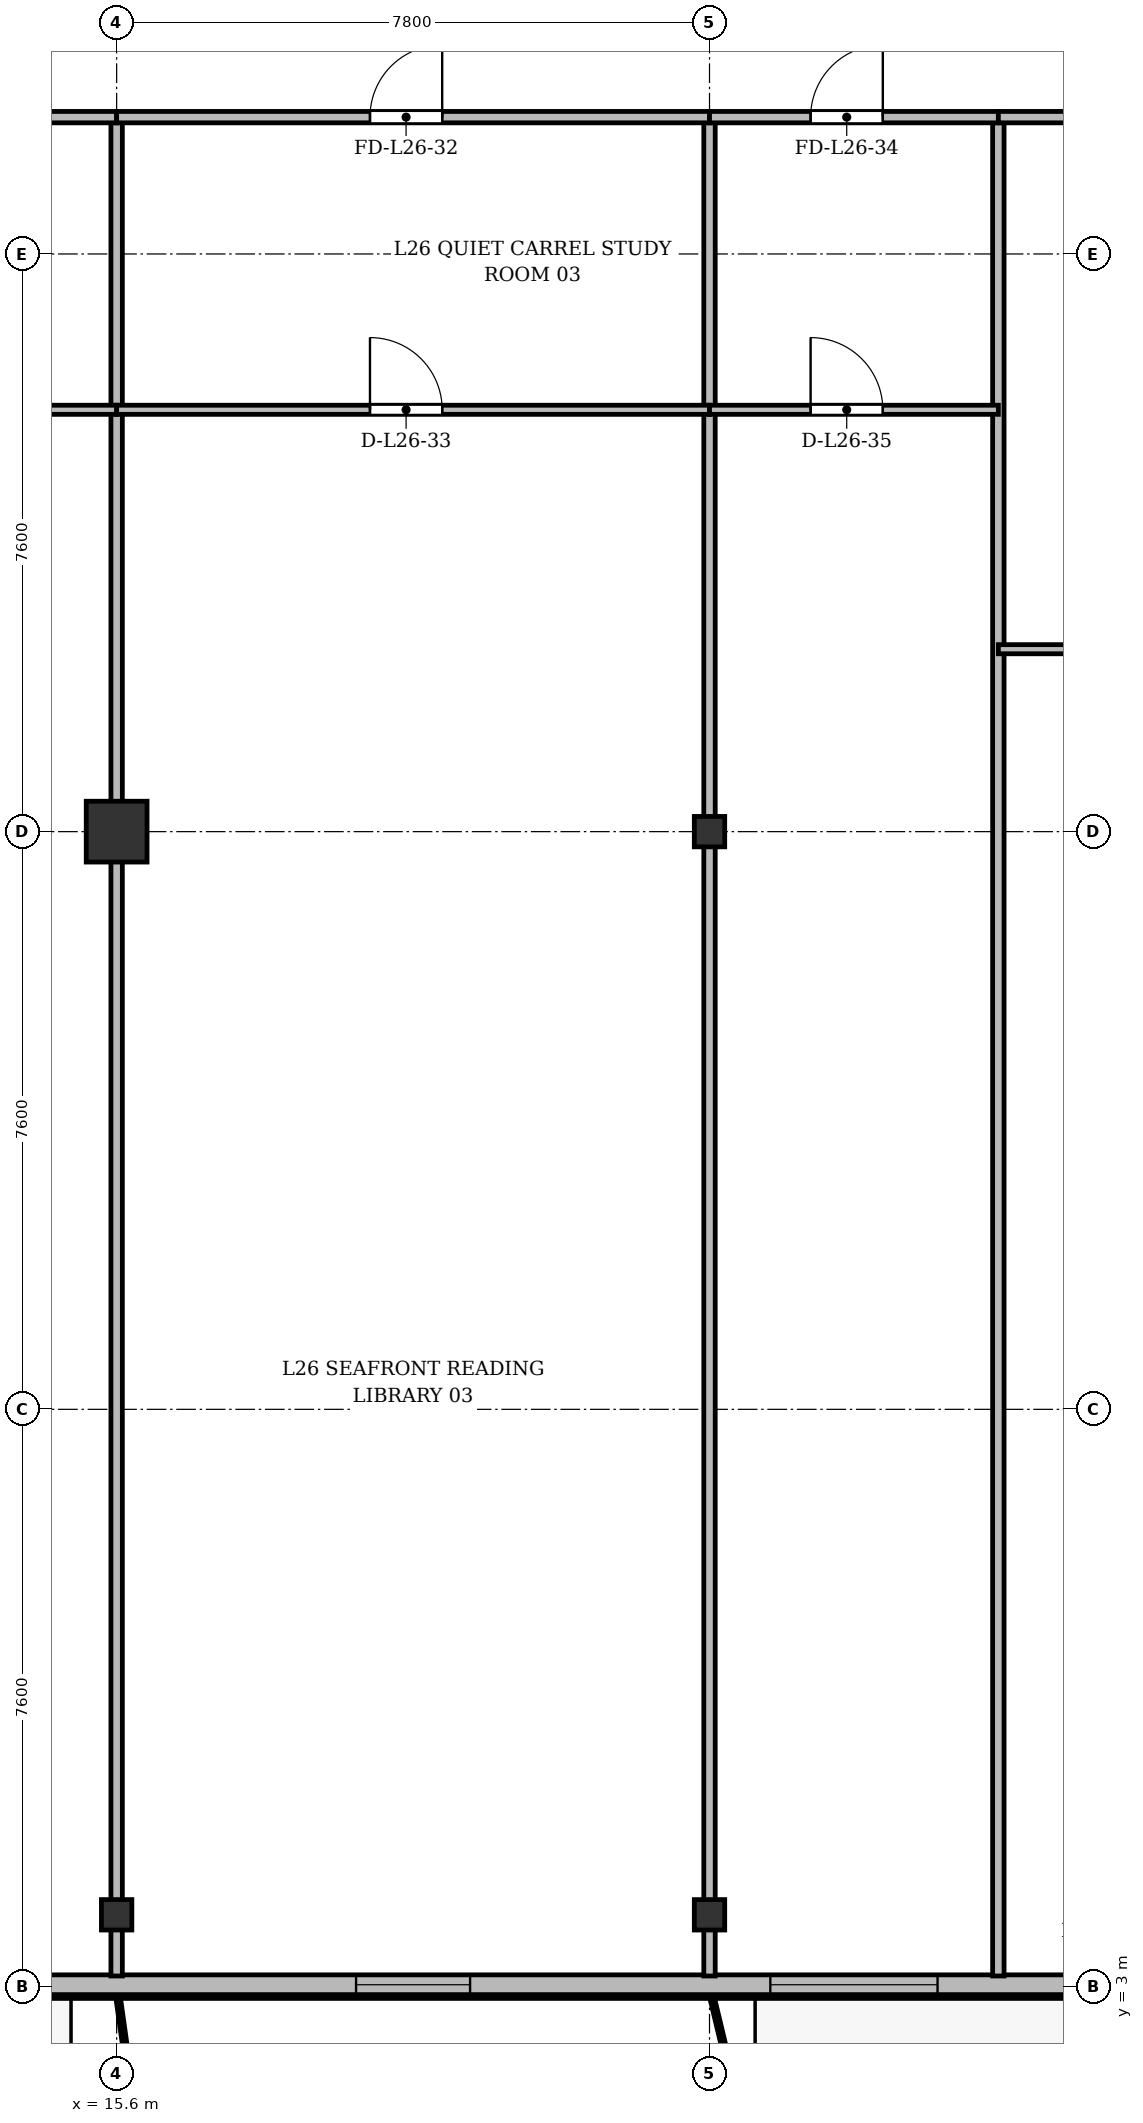
"""IFC4 building model, lengths in metres.
Left out: names, types, materials, properties, quantities, classifications, styles, units other than length and angle.
Written with IfcOpenShell. Run it as: python <this file> out.ifc"""

import sys

from ifc_helpers import new_model, si_unit, direction, frame, frame_2d, origin, origin_2d, place, context, subcontext, project, spatial, rectangle, i_section, extrude, source, transform, mapped, element, fill, save


model = new_model("IFC4")
c1 = context("Model", 3, precision=1e-05, world=origin(), true_north=direction((0.0, 1.0)))
c2 = subcontext(c1, "Body", "Model", "MODEL_VIEW")
j1 = project(units=[si_unit("LENGTHUNIT", "METRE"), si_unit("PLANEANGLEUNIT", "RADIAN")], contexts=[c1])
p1 = place(None, origin())
s1 = spatial("IfcSite", under=j1, at=p1, CompositionType="ELEMENT")
p2 = place(p1, origin())
s2 = spatial("IfcBuilding", under=s1, at=p2, CompositionType="ELEMENT")
p3 = place(p2, frame((0.0, 0.0, 103.3)))
s3 = spatial("IfcBuildingStorey", under=s2, at=p3, CompositionType="ELEMENT", Elevation=103.3)
m1 = source(origin(), c2, "Body", "SweptSolid", [
    extrude(i_section(OverallWidth=0.4, OverallDepth=0.4, WebThickness=0.022, FlangeThickness=0.035, at=origin_2d()), origin(), (0.0, 0.0, 1.0), 3.6),
])
p4 = place(p3, frame((15.6, 3.95, 0.0), z_axis=(0.0, 0.0, 1.0), x_axis=(1.0, 0.0, 0.0)))
e1 = element("IfcColumn", 1, at=p4, inside=s3, PredefinedType="COLUMN", context=c2, shape_type="MappedRepresentation", body=[
    mapped(m1, transform((0.0, 0.0, 0.0), x_axis=(1.0, 0.0, 0.0), y_axis=(0.0, 1.0, 0.0), z_axis=(0.0, 0.0, 1.0), scale=1.0)),
])
m2 = source(origin(), c2, "Body", "SweptSolid", [
    extrude(rectangle(XDim=0.8, YDim=0.8, at=origin_2d()), origin(), (0.0, 0.0, 1.0), 3.6),
])
p5 = place(p3, frame((15.6, 18.2, 0.0), z_axis=(0.0, 0.0, 1.0), x_axis=(1.0, 0.0, 0.0)))
e2 = element("IfcColumn", 2, at=p5, inside=s3, PredefinedType="COLUMN", context=c2, shape_type="MappedRepresentation", body=[
    mapped(m2, transform((0.0, 0.0, 0.0), x_axis=(1.0, 0.0, 0.0), y_axis=(0.0, 1.0, 0.0), z_axis=(0.0, 0.0, 1.0), scale=1.0)),
])
for number, where, z_axis, x_axis in (
    (3, (23.4, 3.95, 0.0), (0.0, 0.0, 1.0), (1.0, 0.0, 0.0)),
    (4, (23.4, 18.2, 0.0), (0.0, 0.0, 1.0), (1.0, 0.0, 0.0)),
):
    element("IfcColumn", number, at=place(p3, frame(where, z_axis=z_axis, x_axis=x_axis)), inside=s3, PredefinedType="COLUMN", context=c2, shape_type="MappedRepresentation", body=[
        mapped(m1, transform((0.0, 0.0, 0.0), x_axis=(1.0, 0.0, 0.0), y_axis=(0.0, 1.0, 0.0), z_axis=(0.0, 0.0, 1.0), scale=1.0)),
    ])
p6 = place(p3, frame((66.9, 3.03, 0.0), z_axis=(0.0, 0.0, 1.0), x_axis=(-1.0, 0.0, 0.0)))
e5 = element("IfcWall", 5, at=p6, inside=s3, PredefinedType="SOLIDWALL", context=c2, shape_type="SweptSolid", body=[
    extrude(rectangle(XDim=59.4, YDim=0.26, at=frame_2d((29.7, 0.0))), origin(), (0.0, 0.0, 1.0), 3.34),
])
p7 = place(p6, frame((2.25, 0.0, 0.9)))
e6 = element("IfcOpeningElement", 6, at=p7, cuts=e5, PredefinedType="OPENING", context=c2, shape_type="SweptSolid", body=[
    extrude(rectangle(XDim=1.5, YDim=1.75, at=frame_2d((0.75, 0.875))), frame((0.0, 0.14, 0.0), z_axis=(0.0, -1.0, 0.0), x_axis=(1.0, 0.0, 0.0)), (0.0, 0.0, 1.0), 0.28),
])
p8 = place(p6, frame((5.4, 0.0, 0.9)))
e7 = element("IfcOpeningElement", 7, at=p8, cuts=e5, PredefinedType="OPENING", context=c2, shape_type="SweptSolid", body=[
    extrude(rectangle(XDim=2.0, YDim=1.95, at=frame_2d((1.0, 0.975))), frame((0.0, 0.14, 0.0), z_axis=(0.0, -1.0, 0.0), x_axis=(1.0, 0.0, 0.0)), (0.0, 0.0, 1.0), 0.28),
])
p9 = place(p6, frame((9.213, 0.0, 0.0)))
e8 = element("IfcOpeningElement", 8, at=p9, cuts=e5, PredefinedType="OPENING", context=c2, shape_type="SweptSolid", body=[
    extrude(rectangle(XDim=1.2, YDim=2.2, at=frame_2d((0.6, 1.1))), frame((0.0, 0.14, 0.0), z_axis=(0.0, -1.0, 0.0), x_axis=(1.0, 0.0, 0.0)), (0.0, 0.0, 1.0), 0.28),
])
p10 = place(p6, frame((13.0, 0.0, 0.9)))
e9 = element("IfcOpeningElement", 9, at=p10, cuts=e5, PredefinedType="OPENING", context=c2, shape_type="SweptSolid", body=[
    extrude(rectangle(XDim=1.8, YDim=1.8, at=frame_2d((0.9, 0.9))), frame((0.0, 0.14, 0.0), z_axis=(0.0, -1.0, 0.0), x_axis=(1.0, 0.0, 0.0)), (0.0, 0.0, 1.0), 0.28),
])
p11 = place(p6, frame((16.6, 0.0, 0.9)))
e10 = element("IfcOpeningElement", 10, at=p11, cuts=e5, PredefinedType="OPENING", context=c2, shape_type="SweptSolid", body=[
    extrude(rectangle(XDim=2.2, YDim=1.8, at=frame_2d((1.1, 0.9))), frame((0.0, 0.14, 0.0), z_axis=(0.0, -1.0, 0.0), x_axis=(1.0, 0.0, 0.0)), (0.0, 0.0, 1.0), 0.28),
])
p12 = place(p6, frame((20.55, 0.0, 0.9)))
e11 = element("IfcOpeningElement", 11, at=p12, cuts=e5, PredefinedType="OPENING", context=c2, shape_type="SweptSolid", body=[
    extrude(rectangle(XDim=1.5, YDim=1.75, at=frame_2d((0.75, 0.875))), frame((0.0, 0.14, 0.0), z_axis=(0.0, -1.0, 0.0), x_axis=(1.0, 0.0, 0.0)), (0.0, 0.0, 1.0), 0.28),
])
p13 = place(p6, frame((25.4, 0.0, 0.9)))
e12 = element("IfcOpeningElement", 12, at=p13, cuts=e5, PredefinedType="OPENING", context=c2, shape_type="SweptSolid", body=[
    extrude(rectangle(XDim=2.0, YDim=1.95, at=frame_2d((1.0, 0.975))), frame((0.0, 0.14, 0.0), z_axis=(0.0, -1.0, 0.0), x_axis=(1.0, 0.0, 0.0)), (0.0, 0.0, 1.0), 0.28),
])
p14 = place(p6, frame((32.175, 0.0, 0.9)))
e13 = element("IfcOpeningElement", 13, at=p14, cuts=e5, PredefinedType="OPENING", context=c2, shape_type="SweptSolid", body=[
    extrude(rectangle(XDim=1.65, YDim=1.85, at=frame_2d((0.825, 0.925))), frame((0.0, 0.14, 0.0), z_axis=(0.0, -1.0, 0.0), x_axis=(1.0, 0.0, 0.0)), (0.0, 0.0, 1.0), 0.28),
])
p15 = place(p6, frame((37.584, 0.0, 0.0)))
e14 = element("IfcOpeningElement", 14, at=p15, cuts=e5, PredefinedType="OPENING", context=c2, shape_type="SweptSolid", body=[
    extrude(rectangle(XDim=1.2, YDim=2.2, at=frame_2d((0.6, 1.1))), frame((0.0, 0.14, 0.0), z_axis=(0.0, -1.0, 0.0), x_axis=(1.0, 0.0, 0.0)), (0.0, 0.0, 1.0), 0.28),
])
p16 = place(p6, frame((40.5, 0.0, 0.9)))
e15 = element("IfcOpeningElement", 15, at=p16, cuts=e5, PredefinedType="OPENING", context=c2, shape_type="SweptSolid", body=[
    extrude(rectangle(XDim=2.2, YDim=1.8, at=frame_2d((1.1, 0.9))), frame((0.0, 0.14, 0.0), z_axis=(0.0, -1.0, 0.0), x_axis=(1.0, 0.0, 0.0)), (0.0, 0.0, 1.0), 0.28),
])
p17 = place(p6, frame((46.65, 0.0, 0.9)))
e16 = element("IfcOpeningElement", 16, at=p17, cuts=e5, PredefinedType="OPENING", context=c2, shape_type="SweptSolid", body=[
    extrude(rectangle(XDim=1.5, YDim=1.75, at=frame_2d((0.75, 0.875))), frame((0.0, 0.14, 0.0), z_axis=(0.0, -1.0, 0.0), x_axis=(1.0, 0.0, 0.0)), (0.0, 0.0, 1.0), 0.28),
])
p18 = place(p6, frame((55.817, 0.0, 0.0)))
e17 = element("IfcOpeningElement", 17, at=p18, cuts=e5, PredefinedType="OPENING", context=c2, shape_type="SweptSolid", body=[
    extrude(rectangle(XDim=1.2, YDim=2.2, at=frame_2d((0.6, 1.1))), frame((0.0, 0.14, 0.0), z_axis=(0.0, -1.0, 0.0), x_axis=(1.0, 0.0, 0.0)), (0.0, 0.0, 1.0), 0.28),
])
for number, where, z_axis, x_axis in (
    (18, (15.6, 3.145, 0.0), (0.0, 0.0, 1.0), (0.0, 1.0, 0.0)),
    (19, (23.4, 3.145, 0.0), (0.0, 0.0, 1.0), (0.0, 1.0, 0.0)),
):
    element("IfcWall", number, at=place(p3, frame(where, z_axis=z_axis, x_axis=x_axis)), inside=s3, PredefinedType="PARTITIONING", context=c2, shape_type="SweptSolid", body=[
        extrude(rectangle(XDim=24.455, YDim=0.15, at=frame_2d((12.228, 0.0))), origin(), (0.0, 0.0, 1.0), 2.84),
    ])
p19 = place(p3, frame((27.2, 3.145, 0.0), z_axis=(0.0, 0.0, 1.0), x_axis=(0.0, 1.0, 0.0)))
e20 = element("IfcWall", 20, at=p19, inside=s3, PredefinedType="PARTITIONING", context=c2, shape_type="SweptSolid", body=[
    extrude(rectangle(XDim=24.455, YDim=0.15, at=frame_2d((12.228, 0.0))), origin(), (0.0, 0.0, 1.0), 2.752),
])
p20 = place(p3, frame((8.8, 27.6, 0.0), z_axis=(0.0, 0.0, 1.0), x_axis=(1.0, 0.0, 0.0)))
e21 = element("IfcWall", 21, at=p20, inside=s3, PredefinedType="PARTITIONING", context=c2, shape_type="SweptSolid", body=[
    extrude(rectangle(XDim=6.8, YDim=0.15, at=frame_2d((3.4, 0.0))), origin(), (0.0, 0.0, 1.0), 2.84),
])
p21 = place(p20, frame((2.925, 0.0, 0.0)))
e22 = element("IfcOpeningElement", 22, at=p21, cuts=e21, PredefinedType="OPENING", context=c2, shape_type="SweptSolid", body=[
    extrude(rectangle(XDim=0.95, YDim=2.15, at=frame_2d((0.475, 1.075))), frame((0.0, 0.085, 0.0), z_axis=(0.0, -1.0, 0.0), x_axis=(1.0, 0.0, 0.0)), (0.0, 0.0, 1.0), 0.17),
])
p22 = place(p3, frame((8.8, 23.75, 0.0), z_axis=(0.0, 0.0, 1.0), x_axis=(1.0, 0.0, 0.0)))
e23 = element("IfcWall", 23, at=p22, inside=s3, PredefinedType="PARTITIONING", context=c2, shape_type="SweptSolid", body=[
    extrude(rectangle(XDim=6.8, YDim=0.12, at=frame_2d((3.4, 0.0))), origin(), (0.0, 0.0, 1.0), 2.84),
])
p23 = place(p22, frame((2.925, 0.0, 0.0)))
e24 = element("IfcOpeningElement", 24, at=p23, cuts=e23, PredefinedType="OPENING", context=c2, shape_type="SweptSolid", body=[
    extrude(rectangle(XDim=0.95, YDim=2.15, at=frame_2d((0.475, 1.075))), frame((0.0, 0.07, 0.0), z_axis=(0.0, -1.0, 0.0), x_axis=(1.0, 0.0, 0.0)), (0.0, 0.0, 1.0), 0.14),
])
p24 = place(p3, frame((15.6, 27.6, 0.0), z_axis=(0.0, 0.0, 1.0), x_axis=(1.0, 0.0, 0.0)))
e25 = element("IfcWall", 25, at=p24, inside=s3, PredefinedType="PARTITIONING", context=c2, shape_type="SweptSolid", body=[
    extrude(rectangle(XDim=7.8, YDim=0.15, at=frame_2d((3.9, 0.0))), origin(), (0.0, 0.0, 1.0), 2.84),
])
p25 = place(p24, frame((3.333, 0.0, 0.0)))
e26 = element("IfcOpeningElement", 26, at=p25, cuts=e25, PredefinedType="OPENING", context=c2, shape_type="SweptSolid", body=[
    extrude(rectangle(XDim=0.95, YDim=2.15, at=frame_2d((0.475, 1.075))), frame((0.0, 0.085, 0.0), z_axis=(0.0, -1.0, 0.0), x_axis=(1.0, 0.0, 0.0)), (0.0, 0.0, 1.0), 0.17),
])
p26 = place(p3, frame((15.6, 23.75, 0.0), z_axis=(0.0, 0.0, 1.0), x_axis=(1.0, 0.0, 0.0)))
e27 = element("IfcWall", 27, at=p26, inside=s3, PredefinedType="PARTITIONING", context=c2, shape_type="SweptSolid", body=[
    extrude(rectangle(XDim=7.8, YDim=0.12, at=frame_2d((3.9, 0.0))), origin(), (0.0, 0.0, 1.0), 2.84),
])
p27 = place(p26, frame((3.333, 0.0, 0.0)))
e28 = element("IfcOpeningElement", 28, at=p27, cuts=e27, PredefinedType="OPENING", context=c2, shape_type="SweptSolid", body=[
    extrude(rectangle(XDim=0.95, YDim=2.15, at=frame_2d((0.475, 1.075))), frame((0.0, 0.07, 0.0), z_axis=(0.0, -1.0, 0.0), x_axis=(1.0, 0.0, 0.0)), (0.0, 0.0, 1.0), 0.14),
])
p28 = place(p3, frame((23.4, 27.6, 0.0), z_axis=(0.0, 0.0, 1.0), x_axis=(1.0, 0.0, 0.0)))
e29 = element("IfcWall", 29, at=p28, inside=s3, PredefinedType="PARTITIONING", context=c2, shape_type="SweptSolid", body=[
    extrude(rectangle(XDim=3.8, YDim=0.15, at=frame_2d((1.9, 0.0))), origin(), (0.0, 0.0, 1.0), 2.84),
])
p29 = place(p28, frame((1.33, 0.0, 0.0)))
e30 = element("IfcOpeningElement", 30, at=p29, cuts=e29, PredefinedType="OPENING", context=c2, shape_type="SweptSolid", body=[
    extrude(rectangle(XDim=0.95, YDim=2.15, at=frame_2d((0.475, 1.075))), frame((0.0, 0.085, 0.0), z_axis=(0.0, -1.0, 0.0), x_axis=(1.0, 0.0, 0.0)), (0.0, 0.0, 1.0), 0.17),
])
p30 = place(p3, frame((23.4, 23.75, 0.0), z_axis=(0.0, 0.0, 1.0), x_axis=(1.0, 0.0, 0.0)))
e31 = element("IfcWall", 31, at=p30, inside=s3, PredefinedType="PARTITIONING", context=c2, shape_type="SweptSolid", body=[
    extrude(rectangle(XDim=3.8, YDim=0.12, at=frame_2d((1.9, 0.0))), origin(), (0.0, 0.0, 1.0), 2.84),
])
p31 = place(p30, frame((1.33, 0.0, 0.0)))
e32 = element("IfcOpeningElement", 32, at=p31, cuts=e31, PredefinedType="OPENING", context=c2, shape_type="SweptSolid", body=[
    extrude(rectangle(XDim=0.95, YDim=2.15, at=frame_2d((0.475, 1.075))), frame((0.0, 0.07, 0.0), z_axis=(0.0, -1.0, 0.0), x_axis=(1.0, 0.0, 0.0)), (0.0, 0.0, 1.0), 0.14),
])
p32 = place(p3, frame((27.2, 27.6, 0.0), z_axis=(0.0, 0.0, 1.0), x_axis=(1.0, 0.0, 0.0)))
e33 = element("IfcWall", 33, at=p32, inside=s3, PredefinedType="PARTITIONING", context=c2, shape_type="SweptSolid", body=[
    extrude(rectangle(XDim=3.4, YDim=0.15, at=frame_2d((1.7, 0.0))), origin(), (0.0, 0.0, 1.0), 2.84),
])
p33 = place(p32, frame((1.131, 0.0, 0.0)))
e34 = element("IfcOpeningElement", 34, at=p33, cuts=e33, PredefinedType="OPENING", context=c2, shape_type="SweptSolid", body=[
    extrude(rectangle(XDim=0.95, YDim=2.15, at=frame_2d((0.475, 1.075))), frame((0.0, 0.085, 0.0), z_axis=(0.0, -1.0, 0.0), x_axis=(1.0, 0.0, 0.0)), (0.0, 0.0, 1.0), 0.17),
])
p34 = place(p3, frame((27.2, 20.6, 0.0), z_axis=(0.0, 0.0, 1.0), x_axis=(1.0, 0.0, 0.0)))
e35 = element("IfcWall", 35, at=p34, inside=s3, PredefinedType="PARTITIONING", context=c2, shape_type="SweptSolid", body=[
    extrude(rectangle(XDim=3.4, YDim=0.12, at=frame_2d((1.7, 0.0))), origin(), (0.0, 0.0, 1.0), 2.84),
])
p35 = place(p34, frame((1.131, 0.0, 0.0)))
e36 = element("IfcOpeningElement", 36, at=p35, cuts=e35, PredefinedType="OPENING", context=c2, shape_type="SweptSolid", body=[
    extrude(rectangle(XDim=0.95, YDim=2.15, at=frame_2d((0.475, 1.075))), frame((0.0, 0.07, 0.0), z_axis=(0.0, -1.0, 0.0), x_axis=(1.0, 0.0, 0.0)), (0.0, 0.0, 1.0), 0.14),
])
m3 = source(origin(), c2, "Body", "SweptSolid", [
    extrude(rectangle(XDim=2.2, YDim=1.8, at=frame_2d((1.1, 0.9))), frame((0.0, 0.03, 0.0), z_axis=(0.0, -1.0, 0.0), x_axis=(1.0, 0.0, 0.0)), (0.0, 0.0, 1.0), 0.06),
])
p36 = place(p16, origin())
e37 = element("IfcWindow", 37, at=p36, inside=s3, PartitioningType="SINGLE_PANEL", PredefinedType="WINDOW", context=c2, shape_type="MappedRepresentation", body=[
    mapped(m3, transform((0.0, 0.0, 0.0), x_axis=(1.0, 0.0, 0.0), y_axis=(0.0, 1.0, 0.0), z_axis=(0.0, 0.0, 1.0), scale=1.0)),
])
fill(e15, e37)
m4 = source(origin(), c2, "Body", "SweptSolid", [
    extrude(rectangle(XDim=1.5, YDim=1.75, at=frame_2d((0.75, 0.875))), frame((0.0, 0.03, 0.0), z_axis=(0.0, -1.0, 0.0), x_axis=(1.0, 0.0, 0.0)), (0.0, 0.0, 1.0), 0.06),
])
p37 = place(p17, origin())
e38 = element("IfcWindow", 38, at=p37, inside=s3, PartitioningType="SINGLE_PANEL", PredefinedType="WINDOW", context=c2, shape_type="MappedRepresentation", body=[
    mapped(m4, transform((0.0, 0.0, 0.0), x_axis=(1.0, 0.0, 0.0), y_axis=(0.0, 1.0, 0.0), z_axis=(0.0, 0.0, 1.0), scale=1.0)),
])
fill(e16, e38)
m5 = source(origin(), c2, "Body", "SweptSolid", [
    extrude(rectangle(XDim=0.95, YDim=2.15, at=frame_2d((0.475, 1.075))), frame((0.0, 0.025, 0.0), z_axis=(0.0, -1.0, 0.0), x_axis=(1.0, 0.0, 0.0)), (0.0, 0.0, 1.0), 0.05),
])
p38 = place(p25, origin())
e39 = element("IfcDoor", 39, at=p38, inside=s3, OperationType="SINGLE_SWING_RIGHT", PredefinedType="DOOR", context=c2, shape_type="MappedRepresentation", body=[
    mapped(m5, transform((0.0, 0.0, 0.0), x_axis=(1.0, 0.0, 0.0), y_axis=(0.0, 1.0, 0.0), z_axis=(0.0, 0.0, 1.0), scale=1.0)),
])
fill(e26, e39)
p39 = place(p27, origin())
e40 = element("IfcDoor", 40, at=p39, inside=s3, OperationType="SINGLE_SWING_LEFT", PredefinedType="DOOR", context=c2, shape_type="MappedRepresentation", body=[
    mapped(m5, transform((0.0, 0.0, 0.0), x_axis=(1.0, 0.0, 0.0), y_axis=(0.0, 1.0, 0.0), z_axis=(0.0, 0.0, 1.0), scale=1.0)),
])
fill(e28, e40)
p40 = place(p29, origin())
e41 = element("IfcDoor", 41, at=p40, inside=s3, OperationType="SINGLE_SWING_RIGHT", PredefinedType="DOOR", context=c2, shape_type="MappedRepresentation", body=[
    mapped(m5, transform((0.0, 0.0, 0.0), x_axis=(1.0, 0.0, 0.0), y_axis=(0.0, 1.0, 0.0), z_axis=(0.0, 0.0, 1.0), scale=1.0)),
])
fill(e30, e41)
p41 = place(p31, origin())
e42 = element("IfcDoor", 42, at=p41, inside=s3, OperationType="SINGLE_SWING_LEFT", PredefinedType="DOOR", context=c2, shape_type="MappedRepresentation", body=[
    mapped(m5, transform((0.0, 0.0, 0.0), x_axis=(1.0, 0.0, 0.0), y_axis=(0.0, 1.0, 0.0), z_axis=(0.0, 0.0, 1.0), scale=1.0)),
])
fill(e32, e42)
save(model, sys.argv[1])
